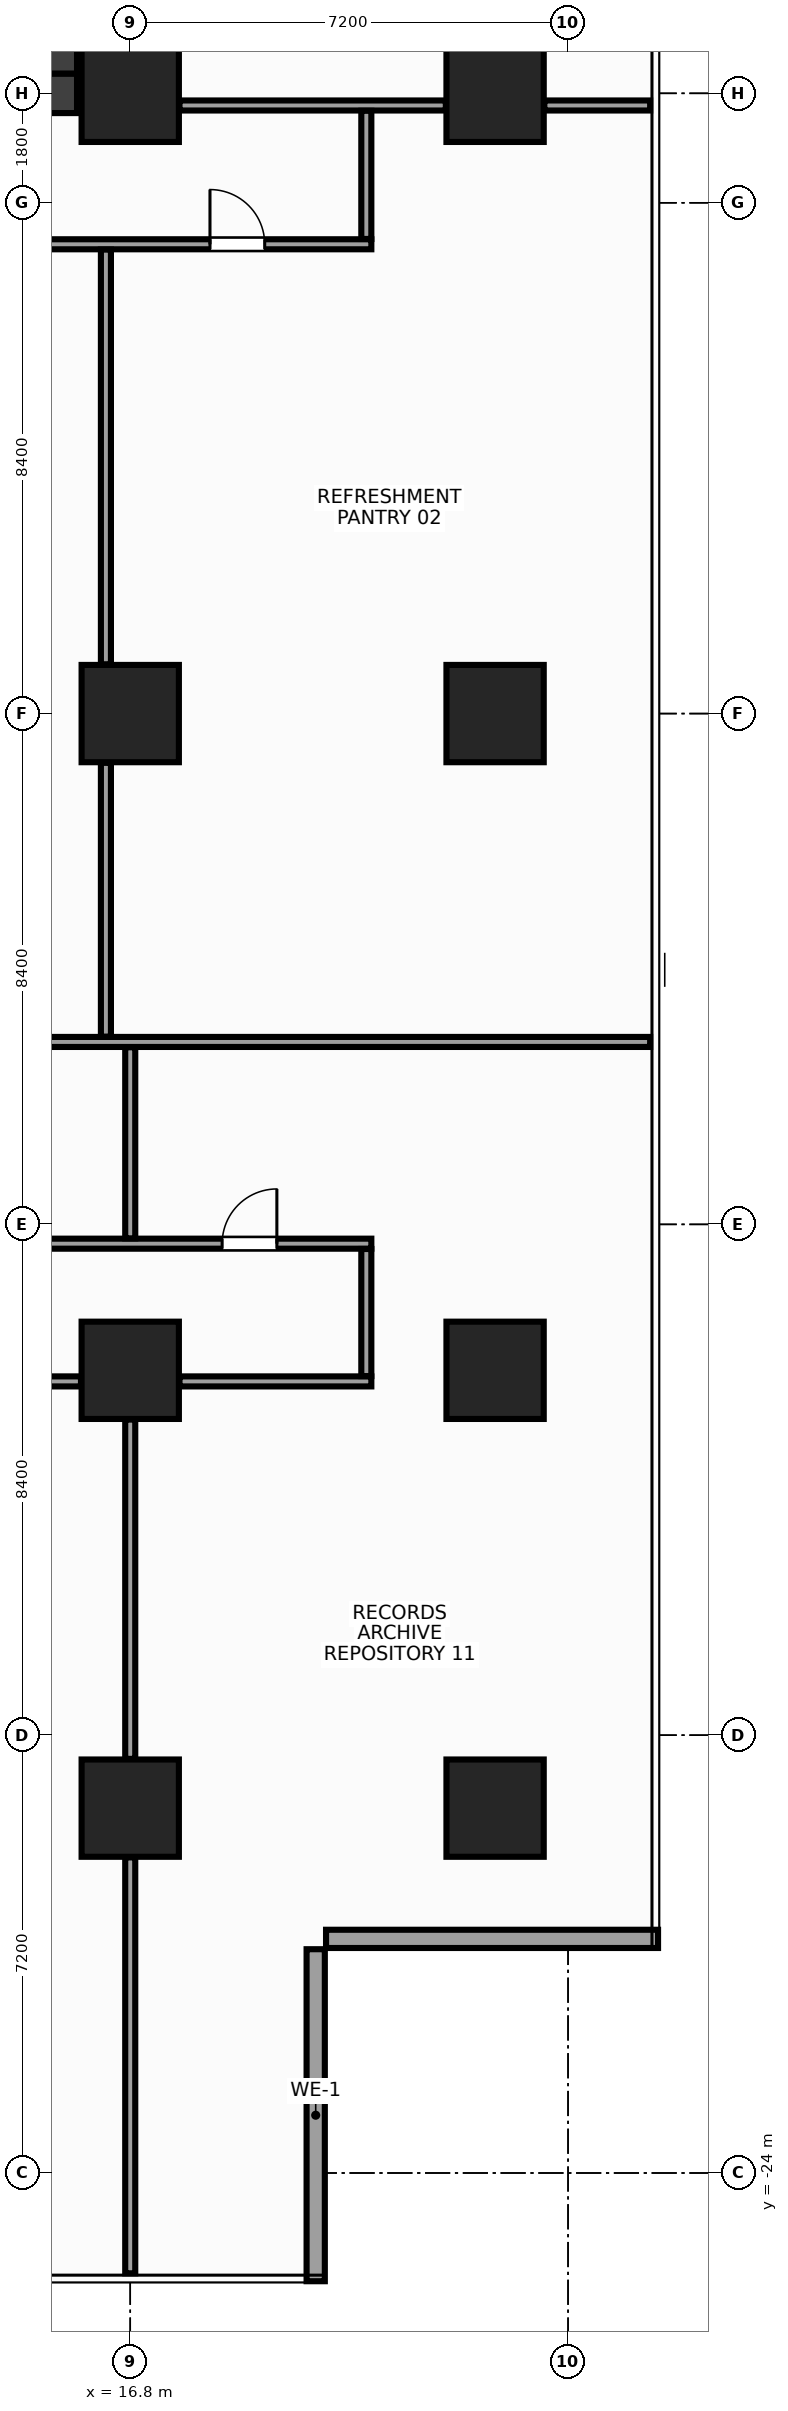
"""IFC4 building model, lengths in metres.
Left out: names, types, materials, properties, quantities, classifications, styles, units other than length and angle.
Written with IfcOpenShell. Run it as: python <this file> out.ifc"""

import sys

from ifc_helpers import new_model, si_unit, direction, frame, frame_2d, origin, origin_2d, place, context, subcontext, project, spatial, rectangle, extrude, source, transform, mapped, element, fill, save


model = new_model("IFC4")
c1 = context("Model", 3, precision=1e-05, world=origin(), true_north=direction((0.0, 1.0)))
c2 = subcontext(c1, "Body", "Model", "MODEL_VIEW")
j1 = project(units=[si_unit("LENGTHUNIT", "METRE"), si_unit("PLANEANGLEUNIT", "RADIAN")], contexts=[c1])
p1 = place(None, origin())
s1 = spatial("IfcSite", under=j1, at=p1, CompositionType="ELEMENT")
p2 = place(p1, origin())
s2 = spatial("IfcBuilding", under=s1, at=p2, CompositionType="ELEMENT")
p3 = place(p2, frame((0.0, 0.0, 102.8)))
s3 = spatial("IfcBuildingStorey", under=s2, at=p3, CompositionType="ELEMENT", Elevation=102.8)
m1 = source(origin(), c2, "Body", "SweptSolid", [
    extrude(rectangle(XDim=31.85, YDim=0.65, at=frame_2d((15.925, 0.0))), origin(), (0.0, 0.0, 1.0), 3.6),
])
p4 = place(p3, frame((-15.925, 10.2, 0.0), z_axis=(0.0, 0.0, 1.0), x_axis=(1.0, 0.0, 0.0)))
e1 = element("IfcWall", 1, at=p4, inside=s3, PredefinedType="SHEAR", context=c2, shape_type="MappedRepresentation", body=[
    mapped(m1, transform((0.0, 0.0, 0.0), x_axis=(1.0, 0.0, 0.0), y_axis=(0.0, 1.0, 0.0), z_axis=(0.0, 0.0, 1.0), scale=1.0)),
])
p5 = place(p4, frame((1.775, 0.0, 0.0)))
e2 = element("IfcOpeningElement", 2, at=p5, cuts=e1, PredefinedType="OPENING", context=c2, shape_type="SweptSolid", body=[
    extrude(rectangle(XDim=1.6, YDim=2.15, at=frame_2d((0.8, 1.075))), frame((0.0, 0.337, 0.0), z_axis=(0.0, -1.0, 0.0), x_axis=(1.0, 0.0, 0.0)), (0.0, 0.0, 1.0), 0.674),
])
p6 = place(p4, frame((28.475, 0.0, 0.0)))
e3 = element("IfcOpeningElement", 3, at=p6, cuts=e1, PredefinedType="OPENING", context=c2, shape_type="SweptSolid", body=[
    extrude(rectangle(XDim=1.6, YDim=2.15, at=frame_2d((0.8, 1.075))), frame((0.0, 0.337, 0.0), z_axis=(0.0, -1.0, 0.0), x_axis=(1.0, 0.0, 0.0)), (0.0, 0.0, 1.0), 0.674),
])
p7 = place(p4, frame((15.175, 0.0, 0.0)))
e4 = element("IfcOpeningElement", 4, at=p7, cuts=e1, PredefinedType="OPENING", context=c2, shape_type="SweptSolid", body=[
    extrude(rectangle(XDim=1.5, YDim=2.2, at=frame_2d((0.75, 1.1))), frame((0.0, 0.337, 0.0), z_axis=(0.0, -1.0, 0.0), x_axis=(1.0, 0.0, 0.0)), (0.0, 0.0, 1.0), 0.674),
])
m2 = source(origin(), c2, "Body", "SweptSolid", [
    extrude(rectangle(XDim=12.95, YDim=0.65, at=frame_2d((6.475, 0.0))), origin(), (0.0, 0.0, 1.0), 3.6),
])
p8 = place(p3, frame((15.6, 10.525, 0.0), z_axis=(0.0, 0.0, 1.0), x_axis=(0.0, 1.0, 0.0)))
e5 = element("IfcWall", 5, at=p8, inside=s3, PredefinedType="SHEAR", context=c2, shape_type="MappedRepresentation", body=[
    mapped(m2, transform((0.0, 0.0, 0.0), x_axis=(1.0, 0.0, 0.0), y_axis=(0.0, 1.0, 0.0), z_axis=(0.0, 0.0, 1.0), scale=1.0)),
])
m3 = source(origin(), c2, "Body", "SweptSolid", [
    extrude(rectangle(XDim=1.6, YDim=1.6, at=origin_2d()), origin(), (0.0, 0.0, 1.0), 3.6),
])
for number, where, z_axis, x_axis in (
    (6, (16.8, -18.0, 0.0), (0.0, 0.0, 1.0), (1.0, 0.0, 0.0)),
    (7, (16.8, -10.8, 0.0), (0.0, 0.0, 1.0), (1.0, 0.0, 0.0)),
    (8, (16.8, 0.0, 0.0), (0.0, 0.0, 1.0), (1.0, 0.0, 0.0)),
    (9, (16.8, 10.2, 0.0), (0.0, 0.0, 1.0), (1.0, 0.0, 0.0)),
    (10, (22.8, -18.0, 0.0), (0.0, 0.0, 1.0), (1.0, 0.0, 0.0)),
    (11, (22.8, -10.8, 0.0), (0.0, 0.0, 1.0), (1.0, 0.0, 0.0)),
    (12, (22.8, 0.0, 0.0), (0.0, 0.0, 1.0), (1.0, 0.0, 0.0)),
    (13, (22.8, 10.2, 0.0), (0.0, 0.0, 1.0), (1.0, 0.0, 0.0)),
):
    element("IfcColumn", number, at=place(p3, frame(where, z_axis=z_axis, x_axis=x_axis)), inside=s3, PredefinedType="COLUMN", context=c2, shape_type="MappedRepresentation", body=[
        mapped(m3, transform((0.0, 0.0, 0.0), x_axis=(1.0, 0.0, 0.0), y_axis=(0.0, 1.0, 0.0), z_axis=(0.0, 0.0, 1.0), scale=1.0)),
    ])
m4 = source(origin(), c2, "Body", "SweptSolid", [
    extrude(rectangle(XDim=5.46, YDim=0.3, at=frame_2d((2.73, 0.0))), origin(), (0.0, 0.0, 1.0), 2.74),
])
for number, where, z_axis, x_axis in (
    (14, (19.85, -25.78, 0.0), (0.0, 0.0, 1.0), (0.0, 1.0, 0.0)),
    (15, (20.02, -20.15, 0.0), (0.0, 0.0, 1.0), (1.0, 0.0, 0.0)),
):
    element("IfcWall", number, at=place(p3, frame(where, z_axis=z_axis, x_axis=x_axis)), inside=s3, PredefinedType="STANDARD", context=c2, shape_type="MappedRepresentation", body=[
        mapped(m4, transform((0.0, 0.0, 0.0), x_axis=(1.0, 0.0, 0.0), y_axis=(0.0, 1.0, 0.0), z_axis=(0.0, 0.0, 1.0), scale=1.0)),
    ])
m5 = source(origin(), c2, "Body", "SweptSolid", [
    extrude(rectangle(XDim=4.38, YDim=0.165, at=frame_2d((2.19, 0.0))), origin(), (0.0, 0.0, 1.0), 2.745),
])
p9 = place(p3, frame((17.61, 10.0, 0.0), z_axis=(0.0, 0.0, 1.0), x_axis=(1.0, 0.0, 0.0)))
e16 = element("IfcWall", 16, at=p9, inside=s3, PredefinedType="PARTITIONING", context=c2, shape_type="MappedRepresentation", body=[
    mapped(m5, transform((0.0, 0.0, 0.0), x_axis=(1.0, 0.0, 0.0), y_axis=(0.0, 1.0, 0.0), z_axis=(0.0, 0.0, 1.0), scale=1.0)),
])
m6 = source(origin(), c2, "Body", "SweptSolid", [
    extrude(rectangle(XDim=1.74, YDim=0.165, at=frame_2d((0.87, 0.0))), origin(), (0.0, 0.0, 1.0), 3.36),
])
p10 = place(p3, frame((23.61, 10.0, 0.0), z_axis=(0.0, 0.0, 1.0), x_axis=(1.0, 0.0, 0.0)))
e17 = element("IfcWall", 17, at=p10, inside=s3, PredefinedType="PARTITIONING", context=c2, shape_type="MappedRepresentation", body=[
    mapped(m6, transform((0.0, 0.0, 0.0), x_axis=(1.0, 0.0, 0.0), y_axis=(0.0, 1.0, 0.0), z_axis=(0.0, 0.0, 1.0), scale=1.0)),
])
m7 = source(origin(), c2, "Body", "SweptSolid", [
    extrude(rectangle(XDim=22.3, YDim=0.165, at=frame_2d((11.15, 0.0))), origin(), (0.0, 0.0, 1.0), 2.745),
])
p11 = place(p3, frame((-1.535, 7.718, 0.0), z_axis=(0.0, 0.0, 1.0), x_axis=(1.0, 0.0, 0.0)))
e18 = element("IfcWall", 18, at=p11, inside=s3, PredefinedType="PARTITIONING", context=c2, shape_type="MappedRepresentation", body=[
    mapped(m7, transform((0.0, 0.0, 0.0), x_axis=(1.0, 0.0, 0.0), y_axis=(0.0, 1.0, 0.0), z_axis=(0.0, 0.0, 1.0), scale=1.0)),
])
p12 = place(p11, frame((19.646, 0.0, 0.0)))
e19 = element("IfcOpeningElement", 19, at=p12, cuts=e18, PredefinedType="OPENING", context=c2, shape_type="SweptSolid", body=[
    extrude(rectangle(XDim=0.9, YDim=2.15, at=frame_2d((0.45, 1.075))), frame((0.0, 0.094, 0.0), z_axis=(0.0, -1.0, 0.0), x_axis=(1.0, 0.0, 0.0)), (0.0, 0.0, 1.0), 0.189),
])
p13 = place(p11, frame((2.236, 0.0, 0.0)))
e20 = element("IfcOpeningElement", 20, at=p13, cuts=e18, PredefinedType="OPENING", context=c2, shape_type="SweptSolid", body=[
    extrude(rectangle(XDim=0.9, YDim=2.15, at=frame_2d((0.45, 1.075))), frame((0.0, 0.094, 0.0), z_axis=(0.0, -1.0, 0.0), x_axis=(1.0, 0.0, 0.0)), (0.0, 0.0, 1.0), 0.189),
])
p14 = place(p11, frame((11.185, 0.0, 0.0)))
e21 = element("IfcOpeningElement", 21, at=p14, cuts=e18, PredefinedType="OPENING", context=c2, shape_type="SweptSolid", body=[
    extrude(rectangle(XDim=0.9, YDim=2.15, at=frame_2d((0.45, 1.075))), frame((0.0, 0.094, 0.0), z_axis=(0.0, -1.0, 0.0), x_axis=(1.0, 0.0, 0.0)), (0.0, 0.0, 1.0), 0.189),
])
p15 = place(p3, frame((-1.535, -8.718, 0.0), z_axis=(0.0, 0.0, 1.0), x_axis=(1.0, 0.0, 0.0)))
e22 = element("IfcWall", 22, at=p15, inside=s3, PredefinedType="PARTITIONING", context=c2, shape_type="MappedRepresentation", body=[
    mapped(m7, transform((0.0, 0.0, 0.0), x_axis=(1.0, 0.0, 0.0), y_axis=(0.0, 1.0, 0.0), z_axis=(0.0, 0.0, 1.0), scale=1.0)),
])
p16 = place(p15, frame((4.036, 0.0, 0.0)))
e23 = element("IfcOpeningElement", 23, at=p16, cuts=e22, PredefinedType="OPENING", context=c2, shape_type="SweptSolid", body=[
    extrude(rectangle(XDim=0.9, YDim=2.15, at=frame_2d((0.45, 1.075))), frame((0.0, 0.094, 0.0), z_axis=(0.0, -1.0, 0.0), x_axis=(1.0, 0.0, 0.0)), (0.0, 0.0, 1.0), 0.189),
])
p17 = place(p15, frame((13.185, 0.0, 0.0)))
e24 = element("IfcOpeningElement", 24, at=p17, cuts=e22, PredefinedType="OPENING", context=c2, shape_type="SweptSolid", body=[
    extrude(rectangle(XDim=0.9, YDim=2.15, at=frame_2d((0.45, 1.075))), frame((0.0, 0.094, 0.0), z_axis=(0.0, -1.0, 0.0), x_axis=(1.0, 0.0, 0.0)), (0.0, 0.0, 1.0), 0.189),
])
p18 = place(p15, frame((19.846, 0.0, 0.0)))
e25 = element("IfcOpeningElement", 25, at=p18, cuts=e22, PredefinedType="OPENING", context=c2, shape_type="SweptSolid", body=[
    extrude(rectangle(XDim=0.9, YDim=2.15, at=frame_2d((0.45, 1.075))), frame((0.0, 0.094, 0.0), z_axis=(0.0, -1.0, 0.0), x_axis=(1.0, 0.0, 0.0)), (0.0, 0.0, 1.0), 0.189),
])
m8 = source(origin(), c2, "Body", "SweptSolid", [
    extrude(rectangle(XDim=7.08, YDim=0.165, at=frame_2d((3.54, 0.0))), origin(), (0.0, 0.0, 1.0), 2.745),
])
p19 = place(p3, frame((8.91, -10.982, 0.0), z_axis=(0.0, 0.0, 1.0), x_axis=(1.0, 0.0, 0.0)))
e26 = element("IfcWall", 26, at=p19, inside=s3, PredefinedType="PARTITIONING", context=c2, shape_type="MappedRepresentation", body=[
    mapped(m8, transform((0.0, 0.0, 0.0), x_axis=(1.0, 0.0, 0.0), y_axis=(0.0, 1.0, 0.0), z_axis=(0.0, 0.0, 1.0), scale=1.0)),
])
p20 = place(p19, frame((3.09, 0.0, 0.0)))
e27 = element("IfcOpeningElement", 27, at=p20, cuts=e26, PredefinedType="OPENING", context=c2, shape_type="SweptSolid", body=[
    extrude(rectangle(XDim=0.9, YDim=2.15, at=frame_2d((0.45, 1.075))), frame((0.0, 0.094, 0.0), z_axis=(0.0, -1.0, 0.0), x_axis=(1.0, 0.0, 0.0)), (0.0, 0.0, 1.0), 0.189),
])
m9 = source(origin(), c2, "Body", "SweptSolid", [
    extrude(rectangle(XDim=3.155, YDim=0.165, at=frame_2d((1.577, 0.0))), origin(), (0.0, 0.0, 1.0), 2.745),
])
p21 = place(p3, frame((17.61, -10.982, 0.0), z_axis=(0.0, 0.0, 1.0), x_axis=(1.0, 0.0, 0.0)))
e28 = element("IfcWall", 28, at=p21, inside=s3, PredefinedType="PARTITIONING", context=c2, shape_type="MappedRepresentation", body=[
    mapped(m9, transform((0.0, 0.0, 0.0), x_axis=(1.0, 0.0, 0.0), y_axis=(0.0, 1.0, 0.0), z_axis=(0.0, 0.0, 1.0), scale=1.0)),
])
m10 = source(origin(), c2, "Body", "SweptSolid", [
    extrude(rectangle(XDim=2.108, YDim=0.165, at=frame_2d((1.054, 0.0))), origin(), (0.0, 0.0, 1.0), 3.36),
])
p22 = place(p3, frame((20.683, 7.805, 0.0), z_axis=(0.0, 0.0, 1.0), x_axis=(0.0, 1.0, 0.0)))
e29 = element("IfcWall", 29, at=p22, inside=s3, PredefinedType="PARTITIONING", context=c2, shape_type="MappedRepresentation", body=[
    mapped(m10, transform((0.0, 0.0, 0.0), x_axis=(1.0, 0.0, 0.0), y_axis=(0.0, 1.0, 0.0), z_axis=(0.0, 0.0, 1.0), scale=1.0)),
])
m11 = source(origin(), c2, "Body", "SweptSolid", [
    extrude(rectangle(XDim=2.09, YDim=0.165, at=frame_2d((1.045, 0.0))), origin(), (0.0, 0.0, 1.0), 3.36),
])
p23 = place(p3, frame((20.683, -10.895, 0.0), z_axis=(0.0, 0.0, 1.0), x_axis=(0.0, 1.0, 0.0)))
e30 = element("IfcWall", 30, at=p23, inside=s3, PredefinedType="PARTITIONING", context=c2, shape_type="MappedRepresentation", body=[
    mapped(m11, transform((0.0, 0.0, 0.0), x_axis=(1.0, 0.0, 0.0), y_axis=(0.0, 1.0, 0.0), z_axis=(0.0, 0.0, 1.0), scale=1.0)),
])
m12 = source(origin(), c2, "Body", "SweptSolid", [
    extrude(rectangle(XDim=26.88, YDim=0.165, at=frame_2d((13.44, 0.0))), origin(), (0.0, 0.0, 1.0), 2.745),
])
p24 = place(p3, frame((-1.53, -5.4, 0.0), z_axis=(0.0, 0.0, 1.0), x_axis=(1.0, 0.0, 0.0)))
e31 = element("IfcWall", 31, at=p24, inside=s3, PredefinedType="PARTITIONING", context=c2, shape_type="MappedRepresentation", body=[
    mapped(m12, transform((0.0, 0.0, 0.0), x_axis=(1.0, 0.0, 0.0), y_axis=(0.0, 1.0, 0.0), z_axis=(0.0, 0.0, 1.0), scale=1.0)),
])
m13 = source(origin(), c2, "Body", "SweptSolid", [
    extrude(rectangle(XDim=4.502, YDim=0.165, at=frame_2d((2.251, 0.0))), origin(), (0.0, 0.0, 1.0), 3.36),
])
p25 = place(p3, frame((16.4, -5.312, 0.0), z_axis=(0.0, 0.0, 1.0), x_axis=(0.0, 1.0, 0.0)))
e32 = element("IfcWall", 32, at=p25, inside=s3, PredefinedType="PARTITIONING", context=c2, shape_type="MappedRepresentation", body=[
    mapped(m13, transform((0.0, 0.0, 0.0), x_axis=(1.0, 0.0, 0.0), y_axis=(0.0, 1.0, 0.0), z_axis=(0.0, 0.0, 1.0), scale=1.0)),
])
m14 = source(origin(), c2, "Body", "SweptSolid", [
    extrude(rectangle(XDim=6.82, YDim=0.165, at=frame_2d((3.41, 0.0))), origin(), (0.0, 0.0, 1.0), 2.645),
])
p26 = place(p3, frame((16.4, 0.81, 0.0), z_axis=(0.0, 0.0, 1.0), x_axis=(0.0, 1.0, 0.0)))
e33 = element("IfcWall", 33, at=p26, inside=s3, PredefinedType="PARTITIONING", context=c2, shape_type="MappedRepresentation", body=[
    mapped(m14, transform((0.0, 0.0, 0.0), x_axis=(1.0, 0.0, 0.0), y_axis=(0.0, 1.0, 0.0), z_axis=(0.0, 0.0, 1.0), scale=1.0)),
])
m15 = source(origin(), c2, "Body", "SweptSolid", [
    extrude(rectangle(XDim=6.84, YDim=0.165, at=frame_2d((3.42, 0.0))), origin(), (0.0, 0.0, 1.0), 3.36),
])
p27 = place(p3, frame((16.8, -25.65, 0.0), z_axis=(0.0, 0.0, 1.0), x_axis=(0.0, 1.0, 0.0)))
e34 = element("IfcWall", 34, at=p27, inside=s3, PredefinedType="PARTITIONING", context=c2, shape_type="MappedRepresentation", body=[
    mapped(m15, transform((0.0, 0.0, 0.0), x_axis=(1.0, 0.0, 0.0), y_axis=(0.0, 1.0, 0.0), z_axis=(0.0, 0.0, 1.0), scale=1.0)),
])
m16 = source(origin(), c2, "Body", "SweptSolid", [
    extrude(rectangle(XDim=5.58, YDim=0.165, at=frame_2d((2.79, 0.0))), origin(), (0.0, 0.0, 1.0), 2.945),
])
p28 = place(p3, frame((16.8, -17.19, 0.0), z_axis=(0.0, 0.0, 1.0), x_axis=(0.0, 1.0, 0.0)))
e35 = element("IfcWall", 35, at=p28, inside=s3, PredefinedType="PARTITIONING", context=c2, shape_type="MappedRepresentation", body=[
    mapped(m16, transform((0.0, 0.0, 0.0), x_axis=(1.0, 0.0, 0.0), y_axis=(0.0, 1.0, 0.0), z_axis=(0.0, 0.0, 1.0), scale=1.0)),
])
m17 = source(origin(), c2, "Body", "SweptSolid", [
    extrude(rectangle(XDim=3.142, YDim=0.165, at=frame_2d((1.571, 0.0))), origin(), (0.0, 0.0, 1.0), 2.745),
])
p29 = place(p3, frame((16.8, -8.63, 0.0), z_axis=(0.0, 0.0, 1.0), x_axis=(0.0, 1.0, 0.0)))
e36 = element("IfcWall", 36, at=p29, inside=s3, PredefinedType="PARTITIONING", context=c2, shape_type="MappedRepresentation", body=[
    mapped(m17, transform((0.0, 0.0, 0.0), x_axis=(1.0, 0.0, 0.0), y_axis=(0.0, 1.0, 0.0), z_axis=(0.0, 0.0, 1.0), scale=1.0)),
])
m18 = source(origin(), c2, "Body", "SweptSolid", [
    extrude(rectangle(XDim=0.9, YDim=2.15, at=frame_2d((0.45, 1.075))), frame((0.0, 0.025, 0.0), z_axis=(0.0, -1.0, 0.0), x_axis=(1.0, 0.0, 0.0)), (0.0, 0.0, 1.0), 0.05),
])
p30 = place(p12, origin())
e37 = element("IfcDoor", 37, at=p30, inside=s3, OperationType="SINGLE_SWING_LEFT", PredefinedType="DOOR", context=c2, shape_type="MappedRepresentation", body=[
    mapped(m18, transform((0.0, 0.0, 0.0), x_axis=(1.0, 0.0, 0.0), y_axis=(0.0, 1.0, 0.0), z_axis=(0.0, 0.0, 1.0), scale=1.0)),
])
fill(e19, e37)
p31 = place(p18, origin())
e38 = element("IfcDoor", 38, at=p31, inside=s3, OperationType="SINGLE_SWING_RIGHT", PredefinedType="DOOR", context=c2, shape_type="MappedRepresentation", body=[
    mapped(m18, transform((0.0, 0.0, 0.0), x_axis=(1.0, 0.0, 0.0), y_axis=(0.0, 1.0, 0.0), z_axis=(0.0, 0.0, 1.0), scale=1.0)),
])
fill(e25, e38)
save(model, sys.argv[1])
